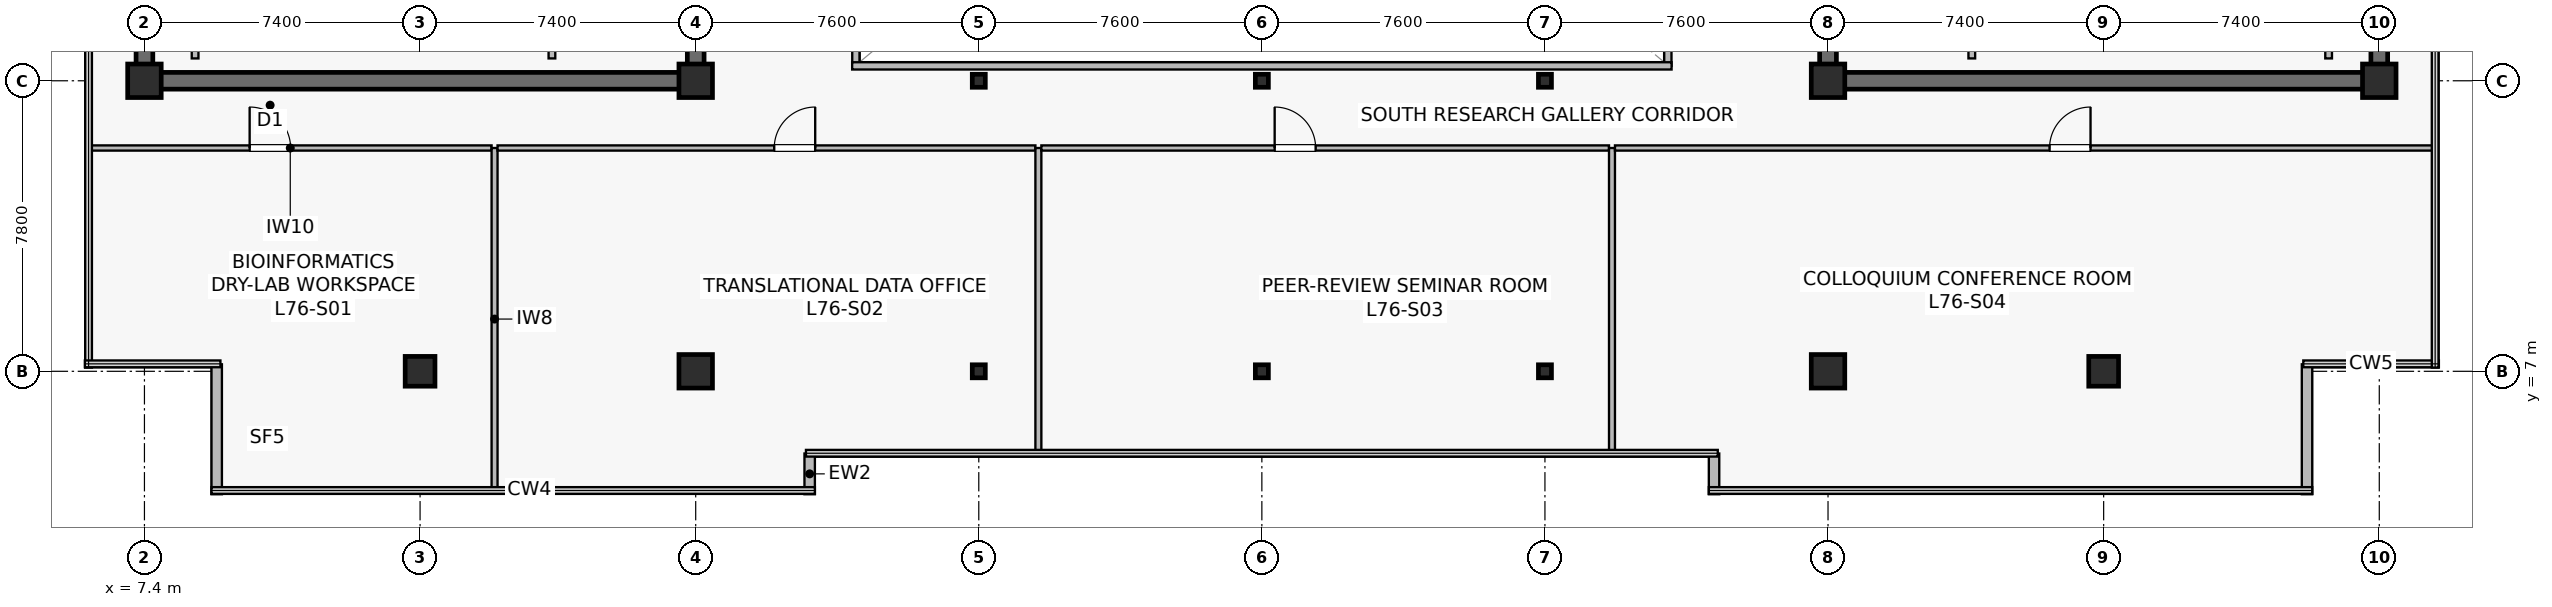
"""IFC4 building model, lengths in metres.
Left out: names, types, materials, properties, quantities, classifications, styles, units other than length and angle.
Written with IfcOpenShell. Run it as: python <this file> out.ifc"""

import sys

from ifc_helpers import new_model, si_unit, direction, frame, frame_2d, origin, origin_2d, place, context, subcontext, project, spatial, rectangle, i_section, extrude, source, transform, mapped, element, fill, save


model = new_model("IFC4")
c1 = context("Model", 3, precision=1e-05, world=origin(), true_north=direction((0.0, 1.0)))
c2 = subcontext(c1, "Body", "Model", "MODEL_VIEW")
j1 = project(units=[si_unit("LENGTHUNIT", "METRE"), si_unit("PLANEANGLEUNIT", "RADIAN")], contexts=[c1])
p1 = place(None, origin())
s1 = spatial("IfcSite", under=j1, at=p1, CompositionType="ELEMENT")
p2 = place(p1, origin())
s2 = spatial("IfcBuilding", under=s1, at=p2, CompositionType="ELEMENT")
p3 = place(p2, frame((0.0, 0.0, 318.6)))
s3 = spatial("IfcBuildingStorey", under=s2, at=p3, CompositionType="ELEMENT", Elevation=318.6)
p4 = place(p3, frame((7.175, 14.8, 0.0), z_axis=(0.0, 0.0, 1.0), x_axis=(1.0, 0.0, 0.0)))
e1 = element("IfcWall", 1, at=p4, inside=s3, PredefinedType="SHEAR", context=c2, shape_type="SweptSolid", body=[
    extrude(rectangle(XDim=15.25, YDim=0.45, at=frame_2d((7.625, 0.0))), origin(), (0.0, 0.0, 1.0), 3.9),
])
p5 = place(p3, frame((7.4, 15.025, 0.0), z_axis=(0.0, 0.0, 1.0), x_axis=(0.0, 1.0, 0.0)))
e2 = element("IfcWall", 2, at=p5, inside=s3, PredefinedType="SHEAR", context=c2, shape_type="SweptSolid", body=[
    extrude(rectangle(XDim=18.55, YDim=0.45, at=frame_2d((9.275, 0.0))), origin(), (0.0, 0.0, 1.0), 3.9),
])
p6 = place(p3, frame((22.2, 15.025, 0.0), z_axis=(0.0, 0.0, 1.0), x_axis=(0.0, 1.0, 0.0)))
e3 = element("IfcWall", 3, at=p6, inside=s3, PredefinedType="SHEAR", context=c2, shape_type="SweptSolid", body=[
    extrude(rectangle(XDim=18.55, YDim=0.45, at=frame_2d((9.275, 0.0))), origin(), (0.0, 0.0, 1.0), 3.9),
])
p7 = place(p6, frame((3.525, 0.0, 0.0)))
e4 = element("IfcOpeningElement", 4, at=p7, cuts=e3, PredefinedType="OPENING", context=c2, shape_type="SweptSolid", body=[
    extrude(rectangle(XDim=1.42, YDim=2.2, at=frame_2d((0.71, 1.1))), frame((0.0, 0.235, 0.0), z_axis=(0.0, -1.0, 0.0), x_axis=(1.0, 0.0, 0.0)), (0.0, 0.0, 1.0), 0.47),
])
p8 = place(p3, frame((52.375, 14.8, 0.0), z_axis=(0.0, 0.0, 1.0), x_axis=(1.0, 0.0, 0.0)))
e5 = element("IfcWall", 5, at=p8, inside=s3, PredefinedType="SHEAR", context=c2, shape_type="SweptSolid", body=[
    extrude(rectangle(XDim=15.25, YDim=0.45, at=frame_2d((7.625, 0.0))), origin(), (0.0, 0.0, 1.0), 3.9),
])
p9 = place(p3, frame((52.6, 15.025, 0.0), z_axis=(0.0, 0.0, 1.0), x_axis=(0.0, 1.0, 0.0)))
e6 = element("IfcWall", 6, at=p9, inside=s3, PredefinedType="SHEAR", context=c2, shape_type="SweptSolid", body=[
    extrude(rectangle(XDim=18.55, YDim=0.45, at=frame_2d((9.275, 0.0))), origin(), (0.0, 0.0, 1.0), 3.9),
])
p10 = place(p9, frame((3.525, 0.0, 0.0)))
e7 = element("IfcOpeningElement", 7, at=p10, cuts=e6, PredefinedType="OPENING", context=c2, shape_type="SweptSolid", body=[
    extrude(rectangle(XDim=1.42, YDim=2.2, at=frame_2d((0.71, 1.1))), frame((0.0, 0.235, 0.0), z_axis=(0.0, -1.0, 0.0), x_axis=(1.0, 0.0, 0.0)), (0.0, 0.0, 1.0), 0.47),
])
p11 = place(p3, frame((67.4, 15.025, 0.0), z_axis=(0.0, 0.0, 1.0), x_axis=(0.0, 1.0, 0.0)))
e8 = element("IfcWall", 8, at=p11, inside=s3, PredefinedType="SHEAR", context=c2, shape_type="SweptSolid", body=[
    extrude(rectangle(XDim=18.55, YDim=0.45, at=frame_2d((9.275, 0.0))), origin(), (0.0, 0.0, 1.0), 3.9),
])
m1 = source(origin(), c2, "Body", "SweptSolid", [
    extrude(rectangle(XDim=0.8, YDim=0.8, at=origin_2d()), origin(), (0.0, 0.0, 1.0), 4.2),
])
p12 = place(p3, frame((14.8, 7.0, 0.0), z_axis=(0.0, 0.0, 1.0), x_axis=(1.0, 0.0, 0.0)))
e9 = element("IfcColumn", 9, at=p12, inside=s3, PredefinedType="COLUMN", context=c2, shape_type="MappedRepresentation", body=[
    mapped(m1, transform((0.0, 0.0, 0.0), scale=1.0)),
])
m2 = source(origin(), c2, "Body", "SweptSolid", [
    extrude(rectangle(XDim=0.9, YDim=0.9, at=origin_2d()), origin(), (0.0, 0.0, 1.0), 4.2),
])
for number, where, z_axis, x_axis in (
    (10, (22.2, 7.0, 0.0), (0.0, 0.0, 1.0), (1.0, 0.0, 0.0)),
    (11, (7.4, 14.8, 0.0), (0.0, 0.0, 1.0), (1.0, 0.0, 0.0)),
    (12, (22.2, 14.8, 0.0), (0.0, 0.0, 1.0), (1.0, 0.0, 0.0)),
    (13, (52.6, 7.0, 0.0), (0.0, 0.0, 1.0), (1.0, 0.0, 0.0)),
):
    element("IfcColumn", number, at=place(p3, frame(where, z_axis=z_axis, x_axis=x_axis)), inside=s3, PredefinedType="COLUMN", context=c2, shape_type="MappedRepresentation", body=[
        mapped(m2, transform((0.0, 0.0, 0.0), scale=1.0)),
    ])
p13 = place(p3, frame((60.0, 7.0, 0.0), z_axis=(0.0, 0.0, 1.0), x_axis=(1.0, 0.0, 0.0)))
e14 = element("IfcColumn", 14, at=p13, inside=s3, PredefinedType="COLUMN", context=c2, shape_type="MappedRepresentation", body=[
    mapped(m1, transform((0.0, 0.0, 0.0), scale=1.0)),
])
for number, where, z_axis, x_axis in (
    (15, (52.6, 14.8, 0.0), (0.0, 0.0, 1.0), (1.0, 0.0, 0.0)),
    (16, (67.4, 14.8, 0.0), (0.0, 0.0, 1.0), (1.0, 0.0, 0.0)),
):
    element("IfcColumn", number, at=place(p3, frame(where, z_axis=z_axis, x_axis=x_axis)), inside=s3, PredefinedType="COLUMN", context=c2, shape_type="MappedRepresentation", body=[
        mapped(m2, transform((0.0, 0.0, 0.0), scale=1.0)),
    ])
m3 = source(origin(), c2, "Body", "SweptSolid", [
    extrude(i_section(OverallWidth=0.35, OverallDepth=0.35, WebThickness=0.012, FlangeThickness=0.019, at=origin_2d()), origin(), (0.0, 0.0, 1.0), 4.2),
])
for number, where, z_axis, x_axis in (
    (17, (29.8, 7.0, 0.0), (0.0, 0.0, 1.0), (1.0, 0.0, 0.0)),
    (18, (29.8, 14.8, 0.0), (0.0, 0.0, 1.0), (1.0, 0.0, 0.0)),
    (19, (37.4, 7.0, 0.0), (0.0, 0.0, 1.0), (1.0, 0.0, 0.0)),
    (20, (37.4, 14.8, 0.0), (0.0, 0.0, 1.0), (1.0, 0.0, 0.0)),
    (21, (45.0, 7.0, 0.0), (0.0, 0.0, 1.0), (1.0, 0.0, 0.0)),
    (22, (45.0, 14.8, 0.0), (0.0, 0.0, 1.0), (1.0, 0.0, 0.0)),
):
    element("IfcColumn", number, at=place(p3, frame(where, z_axis=z_axis, x_axis=x_axis)), inside=s3, PredefinedType="COLUMN", context=c2, shape_type="MappedRepresentation", body=[
        mapped(m3, transform((0.0, 0.0, 0.0), scale=1.0)),
    ])
for number, where, z_axis, x_axis in (
    (23, (25.26, 3.7, 0.0), (0.0, 0.0, 1.0), (0.0, 1.0, 0.0)),
    (24, (49.54, 4.793, 0.0), (0.0, 0.0, 1.0), (0.0, -1.0, 0.0)),
):
    element("IfcWall", number, at=place(p3, frame(where, z_axis=z_axis, x_axis=x_axis)), inside=s3, PredefinedType="STANDARD", context=c2, shape_type="SweptSolid", body=[
        extrude(rectangle(XDim=1.093, YDim=0.28, at=frame_2d((0.546, 0.0))), origin(), (0.0, 0.0, 1.0), 3.9),
    ])
for number, where, z_axis, x_axis in (
    (25, (65.46, 3.7, 0.0), (0.0, 0.0, 1.0), (0.0, 1.0, 0.0)),
    (26, (9.34, 7.188, 0.0), (0.0, 0.0, 1.0), (0.0, -1.0, 0.0)),
):
    element("IfcWall", number, at=place(p3, frame(where, z_axis=z_axis, x_axis=x_axis)), inside=s3, PredefinedType="STANDARD", context=c2, shape_type="SweptSolid", body=[
        extrude(rectangle(XDim=3.488, YDim=0.28, at=frame_2d((1.744, 0.0))), origin(), (0.0, 0.0, 1.0), 3.9),
    ])
for number, where, z_axis, x_axis in (
    (27, (18.34, 15.4, 0.0), (0.0, 0.0, 1.0), (0.0, 1.0, 0.0)),
    (28, (8.76, 15.4, 0.0), (0.0, 0.0, 1.0), (0.0, 1.0, 0.0)),
    (29, (56.46, 15.4, 0.0), (0.0, 0.0, 1.0), (0.0, 1.0, 0.0)),
    (30, (66.04, 15.4, 0.0), (0.0, 0.0, 1.0), (0.0, 1.0, 0.0)),
):
    element("IfcWall", number, at=place(p3, frame(where, z_axis=z_axis, x_axis=x_axis)), inside=s3, PredefinedType="SOLIDWALL", context=c2, shape_type="SweptSolid", body=[
        extrude(rectangle(XDim=2.4, YDim=0.18, at=frame_2d((1.2, 0.0))), origin(), (0.0, 0.0, 1.0), 3.9),
    ])
p14 = place(p3, frame((26.5, 15.2, 0.0), z_axis=(0.0, 0.0, 1.0), x_axis=(0.0, 1.0, 0.0)))
e31 = element("IfcWall", 31, at=p14, inside=s3, PredefinedType="SOLIDWALL", context=c2, shape_type="SweptSolid", body=[
    extrude(rectangle(XDim=18.2, YDim=0.195, at=frame_2d((9.1, 0.0))), origin(), (0.0, 0.0, 1.0), 3.9),
])
p15 = place(p14, frame((1.8, 0.0, 0.9)))
e32 = element("IfcOpeningElement", 32, at=p15, cuts=e31, PredefinedType="OPENING", context=c2, shape_type="SweptSolid", body=[
    extrude(rectangle(XDim=1.5, YDim=1.4, at=frame_2d((0.75, 0.7))), frame((0.0, 0.107, 0.0), z_axis=(0.0, -1.0, 0.0), x_axis=(1.0, 0.0, 0.0)), (0.0, 0.0, 1.0), 0.215),
])
p16 = place(p14, frame((13.2, 0.0, 0.9)))
e33 = element("IfcOpeningElement", 33, at=p16, cuts=e31, PredefinedType="OPENING", context=c2, shape_type="SweptSolid", body=[
    extrude(rectangle(XDim=1.5, YDim=1.4, at=frame_2d((0.75, 0.7))), frame((0.0, 0.107, 0.0), z_axis=(0.0, -1.0, 0.0), x_axis=(1.0, 0.0, 0.0)), (0.0, 0.0, 1.0), 0.215),
])
p17 = place(p3, frame((48.3, 15.2, 0.0), z_axis=(0.0, 0.0, 1.0), x_axis=(0.0, 1.0, 0.0)))
e34 = element("IfcWall", 34, at=p17, inside=s3, PredefinedType="SOLIDWALL", context=c2, shape_type="SweptSolid", body=[
    extrude(rectangle(XDim=18.2, YDim=0.195, at=frame_2d((9.1, 0.0))), origin(), (0.0, 0.0, 1.0), 3.9),
])
p18 = place(p17, frame((1.8, 0.0, 0.9)))
e35 = element("IfcOpeningElement", 35, at=p18, cuts=e34, PredefinedType="OPENING", context=c2, shape_type="SweptSolid", body=[
    extrude(rectangle(XDim=1.5, YDim=1.4, at=frame_2d((0.75, 0.7))), frame((0.0, 0.107, 0.0), z_axis=(0.0, -1.0, 0.0), x_axis=(1.0, 0.0, 0.0)), (0.0, 0.0, 1.0), 0.215),
])
p19 = place(p17, frame((13.2, 0.0, 0.9)))
e36 = element("IfcOpeningElement", 36, at=p19, cuts=e34, PredefinedType="OPENING", context=c2, shape_type="SweptSolid", body=[
    extrude(rectangle(XDim=1.5, YDim=1.4, at=frame_2d((0.75, 0.7))), frame((0.0, 0.107, 0.0), z_axis=(0.0, -1.0, 0.0), x_axis=(1.0, 0.0, 0.0)), (0.0, 0.0, 1.0), 0.215),
])
p20 = place(p3, frame((26.4, 15.2, 0.0), z_axis=(0.0, 0.0, 1.0), x_axis=(1.0, 0.0, 0.0)))
e37 = element("IfcWall", 37, at=p20, inside=s3, PredefinedType="SOLIDWALL", context=c2, shape_type="SweptSolid", body=[
    extrude(rectangle(XDim=22.0, YDim=0.195, at=frame_2d((11.0, 0.0))), origin(), (0.0, 0.0, 1.0), 3.9),
])
p21 = place(p3, frame((5.91, 12.995, 0.0), z_axis=(0.0, 0.0, 1.0), x_axis=(1.0, 0.0, 0.0)))
e38 = element("IfcWall", 38, at=p21, inside=s3, PredefinedType="PARTITIONING", context=c2, shape_type="SweptSolid", body=[
    extrude(rectangle(XDim=10.81, YDim=0.14, at=frame_2d((5.405, 0.0))), origin(), (0.0, 0.0, 1.0), 3.297),
])
p22 = place(p21, frame((4.314, 0.0, 0.0)))
e39 = element("IfcOpeningElement", 39, at=p22, cuts=e38, PredefinedType="OPENING", context=c2, shape_type="SweptSolid", body=[
    extrude(rectangle(XDim=1.1, YDim=2.18, at=frame_2d((0.55, 1.09))), frame((0.0, 0.08, 0.0), z_axis=(0.0, -1.0, 0.0), x_axis=(1.0, 0.0, 0.0)), (0.0, 0.0, 1.0), 0.16),
])
p23 = place(p3, frame((16.8, 3.81, 0.0), z_axis=(0.0, 0.0, 1.0), x_axis=(0.0, 1.0, 0.0)))
e40 = element("IfcWall", 40, at=p23, inside=s3, PredefinedType="PARTITIONING", context=c2, shape_type="SweptSolid", body=[
    extrude(rectangle(XDim=9.185, YDim=0.16, at=frame_2d((4.593, 0.0))), origin(), (0.0, 0.0, 1.0), 3.235),
])
p24 = place(p3, frame((16.88, 12.995, 0.0), z_axis=(0.0, 0.0, 1.0), x_axis=(1.0, 0.0, 0.0)))
e41 = element("IfcWall", 41, at=p24, inside=s3, PredefinedType="PARTITIONING", context=c2, shape_type="SweptSolid", body=[
    extrude(rectangle(XDim=14.44, YDim=0.14, at=frame_2d((7.22, 0.0))), origin(), (0.0, 0.0, 1.0), 3.297),
])
p25 = place(p24, frame((7.428, 0.0, 0.0)))
e42 = element("IfcOpeningElement", 42, at=p25, cuts=e41, PredefinedType="OPENING", context=c2, shape_type="SweptSolid", body=[
    extrude(rectangle(XDim=1.1, YDim=2.18, at=frame_2d((0.55, 1.09))), frame((0.0, 0.08, 0.0), z_axis=(0.0, -1.0, 0.0), x_axis=(1.0, 0.0, 0.0)), (0.0, 0.0, 1.0), 0.16),
])
p26 = place(p3, frame((31.4, 4.81, 0.0), z_axis=(0.0, 0.0, 1.0), x_axis=(0.0, 1.0, 0.0)))
e43 = element("IfcWall", 43, at=p26, inside=s3, PredefinedType="PARTITIONING", context=c2, shape_type="SweptSolid", body=[
    extrude(rectangle(XDim=8.185, YDim=0.16, at=frame_2d((4.093, 0.0))), origin(), (0.0, 0.0, 1.0), 3.235),
])
p27 = place(p3, frame((31.48, 12.995, 0.0), z_axis=(0.0, 0.0, 1.0), x_axis=(1.0, 0.0, 0.0)))
e44 = element("IfcWall", 44, at=p27, inside=s3, PredefinedType="PARTITIONING", context=c2, shape_type="SweptSolid", body=[
    extrude(rectangle(XDim=15.24, YDim=0.14, at=frame_2d((7.62, 0.0))), origin(), (0.0, 0.0, 1.0), 3.297),
])
p28 = place(p27, frame((6.264, 0.0, 0.0)))
e45 = element("IfcOpeningElement", 45, at=p28, cuts=e44, PredefinedType="OPENING", context=c2, shape_type="SweptSolid", body=[
    extrude(rectangle(XDim=1.1, YDim=2.18, at=frame_2d((0.55, 1.09))), frame((0.0, 0.08, 0.0), z_axis=(0.0, -1.0, 0.0), x_axis=(1.0, 0.0, 0.0)), (0.0, 0.0, 1.0), 0.16),
])
p29 = place(p3, frame((46.8, 4.81, 0.0), z_axis=(0.0, 0.0, 1.0), x_axis=(0.0, 1.0, 0.0)))
e46 = element("IfcWall", 46, at=p29, inside=s3, PredefinedType="PARTITIONING", context=c2, shape_type="SweptSolid", body=[
    extrude(rectangle(XDim=8.185, YDim=0.16, at=frame_2d((4.093, 0.0))), origin(), (0.0, 0.0, 1.0), 3.235),
])
p30 = place(p3, frame((46.88, 12.995, 0.0), z_axis=(0.0, 0.0, 1.0), x_axis=(1.0, 0.0, 0.0)))
e47 = element("IfcWall", 47, at=p30, inside=s3, PredefinedType="PARTITIONING", context=c2, shape_type="SweptSolid", body=[
    extrude(rectangle(XDim=22.01, YDim=0.14, at=frame_2d((11.005, 0.0))), origin(), (0.0, 0.0, 1.0), 3.297),
])
p31 = place(p30, frame((11.667, 0.0, 0.0)))
e48 = element("IfcOpeningElement", 48, at=p31, cuts=e47, PredefinedType="OPENING", context=c2, shape_type="SweptSolid", body=[
    extrude(rectangle(XDim=1.1, YDim=2.18, at=frame_2d((0.55, 1.09))), frame((0.0, 0.08, 0.0), z_axis=(0.0, -1.0, 0.0), x_axis=(1.0, 0.0, 0.0)), (0.0, 0.0, 1.0), 0.16),
])
m4 = source(origin(), c2, "Body", "SweptSolid", [
    extrude(rectangle(XDim=1.1, YDim=2.18, at=frame_2d((0.55, 1.09))), frame((0.0, 0.025, 0.0), z_axis=(0.0, -1.0, 0.0), x_axis=(1.0, 0.0, 0.0)), (0.0, 0.0, 1.0), 0.05),
])
p32 = place(p22, origin())
e49 = element("IfcDoor", 49, at=p32, inside=s3, OperationType="SINGLE_SWING_LEFT", PredefinedType="DOOR", context=c2, shape_type="MappedRepresentation", body=[
    mapped(m4, transform((0.0, 0.0, 0.0), scale=1.0)),
])
fill(e39, e49)
p33 = place(p25, origin())
e50 = element("IfcDoor", 50, at=p33, inside=s3, OperationType="SINGLE_SWING_RIGHT", PredefinedType="DOOR", context=c2, shape_type="MappedRepresentation", body=[
    mapped(m4, transform((0.0, 0.0, 0.0), scale=1.0)),
])
fill(e42, e50)
p34 = place(p28, origin())
e51 = element("IfcDoor", 51, at=p34, inside=s3, OperationType="SINGLE_SWING_LEFT", PredefinedType="DOOR", context=c2, shape_type="MappedRepresentation", body=[
    mapped(m4, transform((0.0, 0.0, 0.0), scale=1.0)),
])
fill(e45, e51)
p35 = place(p31, origin())
e52 = element("IfcDoor", 52, at=p35, inside=s3, OperationType="SINGLE_SWING_RIGHT", PredefinedType="DOOR", context=c2, shape_type="MappedRepresentation", body=[
    mapped(m4, transform((0.0, 0.0, 0.0), scale=1.0)),
])
fill(e48, e52)
save(model, sys.argv[1])
